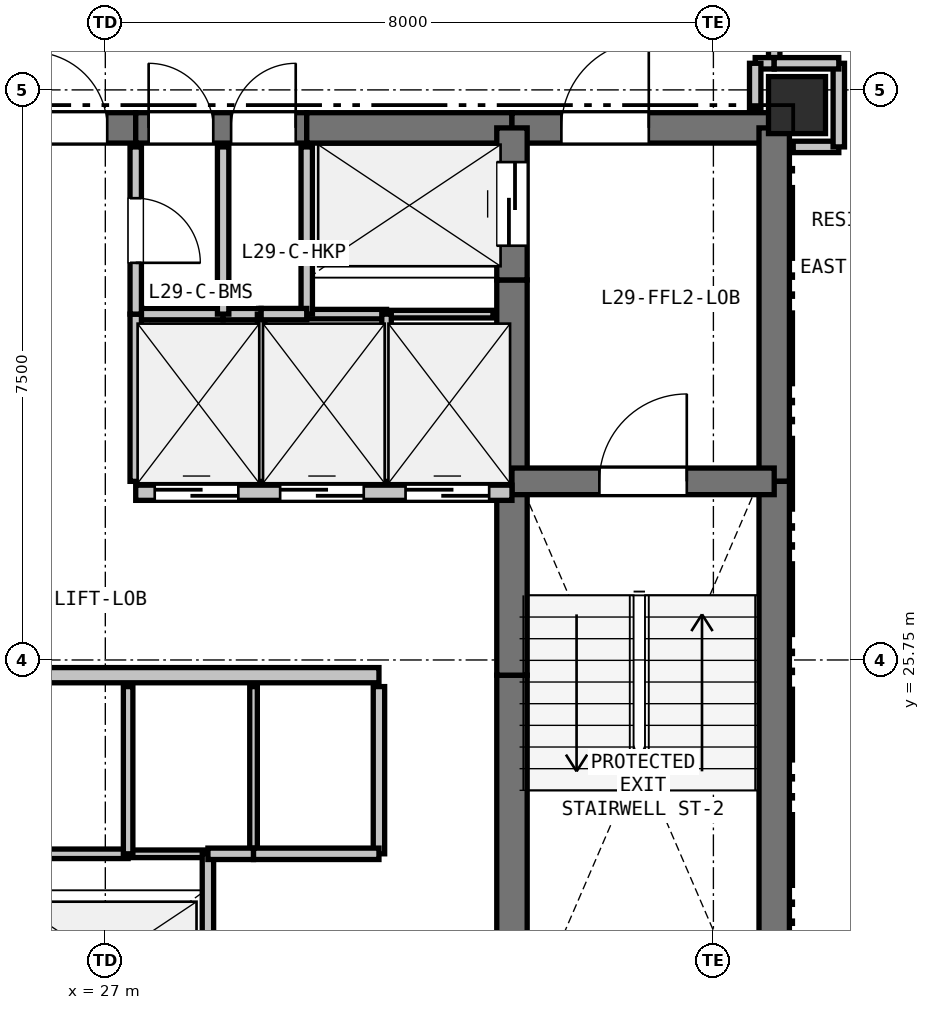
"""IFC4 building model, lengths in metres.
Left out: names, types, materials, properties, quantities, classifications, styles, units other than length and angle.
Written with IfcOpenShell. Run it as: python <this file> out.ifc"""

import sys

from ifc_helpers import new_model, si_unit, direction, frame, frame_2d, origin, origin_2d, place, context, subcontext, project, spatial, rectangle, extrude, element, fill, save


model = new_model("IFC4")
c1 = context("Model", 3, precision=1e-05, world=origin(), true_north=direction((0.0, 1.0)))
c2 = subcontext(c1, "Body", "Model", "MODEL_VIEW")
j1 = project(units=[si_unit("LENGTHUNIT", "METRE"), si_unit("PLANEANGLEUNIT", "RADIAN")], contexts=[c1])
p1 = place(None, origin())
s1 = spatial("IfcSite", under=j1, at=p1, CompositionType="ELEMENT")
p2 = place(p1, origin())
s2 = spatial("IfcBuilding", under=s1, at=p2, CompositionType="ELEMENT")
p3 = place(p2, frame((0.0, 0.0, 106.5)))
s3 = spatial("IfcBuildingStorey", under=s2, at=p3, CompositionType="ELEMENT", Elevation=106.5)
p4 = place(p3, frame((36.1, 33.05, 0.0), z_axis=(0.0, 0.0, 1.0), x_axis=(1.0, 0.0, 0.0)))
e1 = element("IfcColumn", 1, at=p4, inside=s3, PredefinedType="COLUMN", context=c2, shape_type="SweptSolid", body=[
    extrude(rectangle(XDim=0.75, YDim=0.75, at=origin_2d()), origin(), (0.0, 0.0, 1.0), 3.3),
])
p5 = place(p3, frame((25.65, 32.75, 0.0), z_axis=(0.0, 0.0, 1.0), x_axis=(1.0, 0.0, 0.0)))
e2 = element("IfcWall", 2, at=p5, inside=s3, PredefinedType="SHEAR", context=c2, shape_type="SweptSolid", body=[
    extrude(rectangle(XDim=1.75, YDim=0.4, at=frame_2d((0.875, 0.0))), origin(), (0.0, 0.0, 1.0), 3.05),
])
p6 = place(p5, frame((0.375, 0.0, 0.0)))
e3 = element("IfcOpeningElement", 3, at=p6, cuts=e2, PredefinedType="OPENING", context=c2, shape_type="SweptSolid", body=[
    extrude(rectangle(XDim=1.0, YDim=2.15, at=frame_2d((0.5, 1.075))), frame((0.0, 0.21, 0.0), z_axis=(0.0, -1.0, 0.0), x_axis=(1.0, 0.0, 0.0)), (0.0, 0.0, 1.0), 0.42),
])
p7 = place(p3, frame((27.4, 32.75, 0.0), z_axis=(0.0, 0.0, 1.0), x_axis=(1.0, 0.0, 0.0)))
e4 = element("IfcWall", 4, at=p7, inside=s3, PredefinedType="SHEAR", context=c2, shape_type="SweptSolid", body=[
    extrude(rectangle(XDim=2.25, YDim=0.4, at=frame_2d((1.125, 0.0))), origin(), (0.0, 0.0, 1.0), 3.05),
])
p8 = place(p7, frame((0.17, 0.0, 0.0)))
e5 = element("IfcOpeningElement", 5, at=p8, cuts=e4, PredefinedType="OPENING", context=c2, shape_type="SweptSolid", body=[
    extrude(rectangle(XDim=0.85, YDim=2.1, at=frame_2d((0.425, 1.05))), frame((0.0, 0.21, 0.0), z_axis=(0.0, -1.0, 0.0), x_axis=(1.0, 0.0, 0.0)), (0.0, 0.0, 1.0), 0.42),
])
p9 = place(p7, frame((1.255, 0.0, 0.0)))
e6 = element("IfcOpeningElement", 6, at=p9, cuts=e4, PredefinedType="OPENING", context=c2, shape_type="SweptSolid", body=[
    extrude(rectangle(XDim=0.85, YDim=2.1, at=frame_2d((0.425, 1.05))), frame((0.0, 0.21, 0.0), z_axis=(0.0, -1.0, 0.0), x_axis=(1.0, 0.0, 0.0)), (0.0, 0.0, 1.0), 0.42),
])
p10 = place(p3, frame((29.65, 32.75, 0.0), z_axis=(0.0, 0.0, 1.0), x_axis=(1.0, 0.0, 0.0)))
e7 = element("IfcWall", 7, at=p10, inside=s3, PredefinedType="SHEAR", context=c2, shape_type="SweptSolid", body=[
    extrude(rectangle(XDim=2.7, YDim=0.4, at=frame_2d((1.35, 0.0))), origin(), (0.0, 0.0, 1.0), 3.05),
])
p11 = place(p3, frame((32.35, 32.75, 0.0), z_axis=(0.0, 0.0, 1.0), x_axis=(1.0, 0.0, 0.0)))
e8 = element("IfcWall", 8, at=p11, inside=s3, PredefinedType="SHEAR", context=c2, shape_type="SweptSolid", body=[
    extrude(rectangle(XDim=3.45, YDim=0.4, at=frame_2d((1.725, 0.0))), origin(), (0.0, 0.0, 1.0), 3.05),
])
p12 = place(p11, frame((0.65, 0.0, 0.0)))
e9 = element("IfcOpeningElement", 9, at=p12, cuts=e8, PredefinedType="OPENING", context=c2, shape_type="SweptSolid", body=[
    extrude(rectangle(XDim=1.15, YDim=2.15, at=frame_2d((0.575, 1.075))), frame((0.0, 0.21, 0.0), z_axis=(0.0, -1.0, 0.0), x_axis=(1.0, 0.0, 0.0)), (0.0, 0.0, 1.0), 0.42),
])
p13 = place(p3, frame((35.8, 32.75, 0.0), z_axis=(0.0, 0.0, 1.0), x_axis=(0.0, -1.0, 0.0)))
e10 = element("IfcWall", 10, at=p13, inside=s3, PredefinedType="SHEAR", context=c2, shape_type="SweptSolid", body=[
    extrude(rectangle(XDim=4.65, YDim=0.4, at=frame_2d((2.325, 0.0))), origin(), (0.0, 0.0, 1.0), 3.05),
])
p14 = place(p3, frame((35.8, 28.1, 0.0), z_axis=(0.0, 0.0, 1.0), x_axis=(0.0, -1.0, 0.0)))
e11 = element("IfcWall", 11, at=p14, inside=s3, PredefinedType="SHEAR", context=c2, shape_type="SweptSolid", body=[
    extrude(rectangle(XDim=7.35, YDim=0.4, at=frame_2d((3.675, 0.0))), origin(), (0.0, 0.0, 1.0), 3.05),
])
p15 = place(p3, frame((32.35, 20.75, 0.0), z_axis=(0.0, 0.0, 1.0), x_axis=(0.0, 1.0, 0.0)))
e12 = element("IfcWall", 12, at=p15, inside=s3, PredefinedType="SHEAR", context=c2, shape_type="SweptSolid", body=[
    extrude(rectangle(XDim=4.8, YDim=0.4, at=frame_2d((2.4, 0.0))), origin(), (0.0, 0.0, 1.0), 3.05),
])
p16 = place(p3, frame((32.35, 25.55, 0.0), z_axis=(0.0, 0.0, 1.0), x_axis=(0.0, 1.0, 0.0)))
e13 = element("IfcWall", 13, at=p16, inside=s3, PredefinedType="SHEAR", context=c2, shape_type="SweptSolid", body=[
    extrude(rectangle(XDim=2.4, YDim=0.4, at=frame_2d((1.2, 0.0))), origin(), (0.0, 0.0, 1.0), 3.05),
])
p17 = place(p3, frame((32.35, 27.95, 0.0), z_axis=(0.0, 0.0, 1.0), x_axis=(0.0, 1.0, 0.0)))
e14 = element("IfcWall", 14, at=p17, inside=s3, PredefinedType="SHEAR", context=c2, shape_type="SweptSolid", body=[
    extrude(rectangle(XDim=2.8, YDim=0.4, at=frame_2d((1.4, 0.0))), origin(), (0.0, 0.0, 1.0), 3.05),
])
p18 = place(p3, frame((32.35, 30.75, 0.0), z_axis=(0.0, 0.0, 1.0), x_axis=(0.0, 1.0, 0.0)))
e15 = element("IfcWall", 15, at=p18, inside=s3, PredefinedType="SHEAR", context=c2, shape_type="SweptSolid", body=[
    extrude(rectangle(XDim=2.0, YDim=0.4, at=frame_2d((1.0, 0.0))), origin(), (0.0, 0.0, 1.0), 3.05),
])
p19 = place(p18, frame((0.45, 0.0, 0.0)))
e16 = element("IfcOpeningElement", 16, at=p19, cuts=e15, PredefinedType="OPENING", context=c2, shape_type="SweptSolid", body=[
    extrude(rectangle(XDim=1.1, YDim=2.15, at=frame_2d((0.55, 1.075))), frame((0.0, 0.21, 0.0), z_axis=(0.0, -1.0, 0.0), x_axis=(1.0, 0.0, 0.0)), (0.0, 0.0, 1.0), 0.42),
])
p20 = place(p3, frame((32.35, 28.1, 0.0), z_axis=(0.0, 0.0, 1.0), x_axis=(1.0, 0.0, 0.0)))
e17 = element("IfcWall", 17, at=p20, inside=s3, PredefinedType="SHEAR", context=c2, shape_type="SweptSolid", body=[
    extrude(rectangle(XDim=3.45, YDim=0.35, at=frame_2d((1.725, 0.0))), origin(), (0.0, 0.0, 1.0), 3.05),
])
p21 = place(p20, frame((1.15, 0.0, 0.0)))
e18 = element("IfcOpeningElement", 18, at=p21, cuts=e17, PredefinedType="OPENING", context=c2, shape_type="SweptSolid", body=[
    extrude(rectangle(XDim=1.15, YDim=2.15, at=frame_2d((0.575, 1.075))), frame((0.0, 0.185, 0.0), z_axis=(0.0, -1.0, 0.0), x_axis=(1.0, 0.0, 0.0)), (0.0, 0.0, 1.0), 0.37),
])
p22 = place(p3, frame((25.65, 25.55, 0.0), z_axis=(0.0, 0.0, 1.0), x_axis=(1.0, 0.0, 0.0)))
e19 = element("IfcWall", 19, at=p22, inside=s3, PredefinedType="PARTITIONING", context=c2, shape_type="SweptSolid", body=[
    extrude(rectangle(XDim=4.95, YDim=0.2, at=frame_2d((2.475, 0.0))), origin(), (0.0, 0.0, 1.0), 3.05),
])
p23 = place(p3, frame((27.4, 27.95, 0.0), z_axis=(0.0, 0.0, 1.0), x_axis=(1.0, 0.0, 0.0)))
e20 = element("IfcWall", 20, at=p23, inside=s3, PredefinedType="PARTITIONING", context=c2, shape_type="SweptSolid", body=[
    extrude(rectangle(XDim=4.95, YDim=0.2, at=frame_2d((2.475, 0.0))), origin(), (0.0, 0.0, 1.0), 3.05),
])
p24 = place(p23, frame((0.25, 0.0, 0.0)))
e21 = element("IfcOpeningElement", 21, at=p24, cuts=e20, PredefinedType="OPENING", context=c2, shape_type="SweptSolid", body=[
    extrude(rectangle(XDim=1.1, YDim=2.15, at=frame_2d((0.55, 1.075))), frame((0.0, 0.11, 0.0), z_axis=(0.0, -1.0, 0.0), x_axis=(1.0, 0.0, 0.0)), (0.0, 0.0, 1.0), 0.22),
])
p25 = place(p23, frame((1.9, 0.0, 0.0)))
e22 = element("IfcOpeningElement", 22, at=p25, cuts=e20, PredefinedType="OPENING", context=c2, shape_type="SweptSolid", body=[
    extrude(rectangle(XDim=1.1, YDim=2.15, at=frame_2d((0.55, 1.075))), frame((0.0, 0.11, 0.0), z_axis=(0.0, -1.0, 0.0), x_axis=(1.0, 0.0, 0.0)), (0.0, 0.0, 1.0), 0.22),
])
p26 = place(p23, frame((3.55, 0.0, 0.0)))
e23 = element("IfcOpeningElement", 23, at=p26, cuts=e20, PredefinedType="OPENING", context=c2, shape_type="SweptSolid", body=[
    extrude(rectangle(XDim=1.1, YDim=2.15, at=frame_2d((0.55, 1.075))), frame((0.0, 0.11, 0.0), z_axis=(0.0, -1.0, 0.0), x_axis=(1.0, 0.0, 0.0)), (0.0, 0.0, 1.0), 0.22),
])
p27 = place(p3, frame((25.9, 23.2, 0.0), z_axis=(0.0, 0.0, 1.0), x_axis=(1.0, 0.0, 0.0)))
e24 = element("IfcWall", 24, at=p27, inside=s3, PredefinedType="PARTITIONING", context=c2, shape_type="SweptSolid", body=[
    extrude(rectangle(XDim=1.4, YDim=0.125, at=frame_2d((0.7, 0.0))), origin(), (0.0, 0.0, 1.0), 3.05),
])
p28 = place(p3, frame((27.3, 23.2, 0.0), z_axis=(0.0, 0.0, 1.0), x_axis=(1.0, 0.0, 0.0)))
e25 = element("IfcWall", 25, at=p28, inside=s3, PredefinedType="PARTITIONING", context=c2, shape_type="SweptSolid", body=[
    extrude(rectangle(XDim=1.05, YDim=0.1, at=frame_2d((0.525, 0.0))), origin(), (0.0, 0.0, 1.0), 3.05),
])
p29 = place(p3, frame((28.35, 23.2, 0.0), z_axis=(0.0, 0.0, 1.0), x_axis=(0.0, -1.0, 0.0)))
e26 = element("IfcWall", 26, at=p29, inside=s3, PredefinedType="PARTITIONING", context=c2, shape_type="SweptSolid", body=[
    extrude(rectangle(XDim=2.2, YDim=0.15, at=frame_2d((1.1, 0.0))), origin(), (0.0, 0.0, 1.0), 3.05),
])
p30 = place(p3, frame((32.1, 30.3, 0.0), z_axis=(0.0, 0.0, 1.0), x_axis=(-1.0, 0.0, 0.0)))
e27 = element("IfcWall", 27, at=p30, inside=s3, PredefinedType="PARTITIONING", context=c2, shape_type="SweptSolid", body=[
    extrude(rectangle(XDim=1.4, YDim=0.1, at=frame_2d((0.7, 0.0))), origin(), (0.0, 0.0, 1.0), 3.05),
])
p31 = place(p3, frame((30.7, 30.3, 0.0), z_axis=(0.0, 0.0, 1.0), x_axis=(-1.0, 0.0, 0.0)))
e28 = element("IfcWall", 28, at=p31, inside=s3, PredefinedType="PARTITIONING", context=c2, shape_type="SweptSolid", body=[
    extrude(rectangle(XDim=1.05, YDim=0.125, at=frame_2d((0.525, 0.0))), origin(), (0.0, 0.0, 1.0), 3.05),
])
p32 = place(p3, frame((29.65, 30.3, 0.0), z_axis=(0.0, 0.0, 1.0), x_axis=(0.0, 1.0, 0.0)))
e29 = element("IfcWall", 29, at=p32, inside=s3, PredefinedType="PARTITIONING", context=c2, shape_type="SweptSolid", body=[
    extrude(rectangle(XDim=2.2, YDim=0.15, at=frame_2d((1.1, 0.0))), origin(), (0.0, 0.0, 1.0), 3.05),
])
p33 = place(p3, frame((27.3, 25.4, 0.0), z_axis=(0.0, 0.0, 1.0), x_axis=(0.0, -1.0, 0.0)))
e30 = element("IfcWall", 30, at=p33, inside=s3, PredefinedType="PARTITIONING", context=c2, shape_type="SweptSolid", body=[
    extrude(rectangle(XDim=2.2, YDim=0.125, at=frame_2d((1.1, 0.0))), origin(), (0.0, 0.0, 1.0), 3.05),
])
p34 = place(p3, frame((28.95, 25.4, 0.0), z_axis=(0.0, 0.0, 1.0), x_axis=(0.0, -1.0, 0.0)))
e31 = element("IfcWall", 31, at=p34, inside=s3, PredefinedType="PARTITIONING", context=c2, shape_type="SweptSolid", body=[
    extrude(rectangle(XDim=2.2, YDim=0.1, at=frame_2d((1.1, 0.0))), origin(), (0.0, 0.0, 1.0), 3.05),
])
p35 = place(p3, frame((28.95, 23.2, 0.0), z_axis=(0.0, 0.0, 1.0), x_axis=(-1.0, 0.0, 0.0)))
e32 = element("IfcWall", 32, at=p35, inside=s3, PredefinedType="PARTITIONING", context=c2, shape_type="SweptSolid", body=[
    extrude(rectangle(XDim=0.6, YDim=0.15, at=frame_2d((0.3, 0.0))), origin(), (0.0, 0.0, 1.0), 3.05),
])
p36 = place(p3, frame((30.6, 25.4, 0.0), z_axis=(0.0, 0.0, 1.0), x_axis=(0.0, -1.0, 0.0)))
e33 = element("IfcWall", 33, at=p36, inside=s3, PredefinedType="PARTITIONING", context=c2, shape_type="SweptSolid", body=[
    extrude(rectangle(XDim=2.2, YDim=0.15, at=frame_2d((1.1, 0.0))), origin(), (0.0, 0.0, 1.0), 3.05),
])
p37 = place(p3, frame((30.6, 23.2, 0.0), z_axis=(0.0, 0.0, 1.0), x_axis=(-1.0, 0.0, 0.0)))
e34 = element("IfcWall", 34, at=p37, inside=s3, PredefinedType="PARTITIONING", context=c2, shape_type="SweptSolid", body=[
    extrude(rectangle(XDim=1.65, YDim=0.15, at=frame_2d((0.825, 0.0))), origin(), (0.0, 0.0, 1.0), 3.05),
])
p38 = place(p3, frame((27.4, 30.3, 0.0), z_axis=(0.0, 0.0, 1.0), x_axis=(1.0, 0.0, 0.0)))
e35 = element("IfcWall", 35, at=p38, inside=s3, PredefinedType="PARTITIONING", context=c2, shape_type="SweptSolid", body=[
    extrude(rectangle(XDim=1.15, YDim=0.15, at=frame_2d((0.575, 0.0))), origin(), (0.0, 0.0, 1.0), 3.05),
])
p39 = place(p3, frame((28.55, 30.3, 0.0), z_axis=(0.0, 0.0, 1.0), x_axis=(1.0, 0.0, 0.0)))
e36 = element("IfcWall", 36, at=p39, inside=s3, PredefinedType="PARTITIONING", context=c2, shape_type="SweptSolid", body=[
    extrude(rectangle(XDim=0.5, YDim=0.15, at=frame_2d((0.25, 0.0))), origin(), (0.0, 0.0, 1.0), 3.05),
])
p40 = place(p3, frame((29.05, 30.3, 0.0), z_axis=(0.0, 0.0, 1.0), x_axis=(0.0, -1.0, 0.0)))
e37 = element("IfcWall", 37, at=p40, inside=s3, PredefinedType="PARTITIONING", context=c2, shape_type="SweptSolid", body=[
    extrude(rectangle(XDim=2.2, YDim=0.1, at=frame_2d((1.1, 0.0))), origin(), (0.0, 0.0, 1.0), 3.05),
])
p41 = place(p3, frame((27.4, 28.1, 0.0), z_axis=(0.0, 0.0, 1.0), x_axis=(0.0, 1.0, 0.0)))
e38 = element("IfcWall", 38, at=p41, inside=s3, PredefinedType="PARTITIONING", context=c2, shape_type="SweptSolid", body=[
    extrude(rectangle(XDim=2.2, YDim=0.15, at=frame_2d((1.1, 0.0))), origin(), (0.0, 0.0, 1.0), 3.05),
])
p42 = place(p3, frame((29.05, 30.3, 0.0), z_axis=(0.0, 0.0, 1.0), x_axis=(1.0, 0.0, 0.0)))
e39 = element("IfcWall", 39, at=p42, inside=s3, PredefinedType="PARTITIONING", context=c2, shape_type="SweptSolid", body=[
    extrude(rectangle(XDim=0.6, YDim=0.15, at=frame_2d((0.3, 0.0))), origin(), (0.0, 0.0, 1.0), 3.05),
])
p43 = place(p3, frame((30.7, 30.3, 0.0), z_axis=(0.0, 0.0, 1.0), x_axis=(0.0, -1.0, 0.0)))
e40 = element("IfcWall", 40, at=p43, inside=s3, PredefinedType="PARTITIONING", context=c2, shape_type="SweptSolid", body=[
    extrude(rectangle(XDim=2.2, YDim=0.125, at=frame_2d((1.1, 0.0))), origin(), (0.0, 0.0, 1.0), 3.05),
])
p44 = place(p3, frame((27.4, 32.5, 0.0), z_axis=(0.0, 0.0, 1.0), x_axis=(0.0, -1.0, 0.0)))
e41 = element("IfcWall", 41, at=p44, inside=s3, PredefinedType="PARTITIONING", context=c2, shape_type="SweptSolid", body=[
    extrude(rectangle(XDim=2.2, YDim=0.15, at=frame_2d((1.1, 0.0))), origin(), (0.0, 0.0, 1.0), 3.05),
])
p45 = place(p44, frame((0.675, 0.0, 0.0)))
e42 = element("IfcOpeningElement", 42, at=p45, cuts=e41, PredefinedType="OPENING", context=c2, shape_type="SweptSolid", body=[
    extrude(rectangle(XDim=0.85, YDim=2.1, at=frame_2d((0.425, 1.05))), frame((0.0, 0.085, 0.0), z_axis=(0.0, -1.0, 0.0), x_axis=(1.0, 0.0, 0.0)), (0.0, 0.0, 1.0), 0.17),
])
p46 = place(p3, frame((35.8, 35.35, 0.0), z_axis=(0.0, 0.0, 1.0), x_axis=(0.0, -1.0, 0.0)))
e43 = element("IfcWall", 43, at=p46, inside=s3, PredefinedType="PARTITIONING", context=c2, shape_type="SweptSolid", body=[
    extrude(rectangle(XDim=1.75, YDim=0.15, at=frame_2d((0.875, 0.0))), origin(), (0.0, 0.0, 1.0), 3.05),
])
p47 = place(p46, frame((0.375, 0.0, 0.0)))
e44 = element("IfcOpeningElement", 44, at=p47, cuts=e43, PredefinedType="OPENING", context=c2, shape_type="SweptSolid", body=[
    extrude(rectangle(XDim=1.0, YDim=2.15, at=frame_2d((0.5, 1.075))), frame((0.0, 0.085, 0.0), z_axis=(0.0, -1.0, 0.0), x_axis=(1.0, 0.0, 0.0)), (0.0, 0.0, 1.0), 0.17),
])
p48 = place(p3, frame((35.8, 33.6, 0.0), z_axis=(0.0, 0.0, 1.0), x_axis=(-1.0, 0.0, 0.0)))
e45 = element("IfcWall", 45, at=p48, inside=s3, PredefinedType="PARTITIONING", context=c2, shape_type="SweptSolid", body=[
    extrude(rectangle(XDim=0.25, YDim=0.15, at=frame_2d((0.125, 0.0))), origin(), (0.0, 0.0, 1.0), 3.05),
])
p49 = place(p3, frame((35.55, 33.6, 0.0), z_axis=(0.0, 0.0, 1.0), x_axis=(0.0, -1.0, 0.0)))
e46 = element("IfcWall", 46, at=p49, inside=s3, PredefinedType="PARTITIONING", context=c2, shape_type="SweptSolid", body=[
    extrude(rectangle(XDim=0.6, YDim=0.15, at=frame_2d((0.3, 0.0))), origin(), (0.0, 0.0, 1.0), 2.498),
])
p50 = place(p3, frame((36.05, 32.5, 0.0), z_axis=(0.0, 0.0, 1.0), x_axis=(1.0, 0.0, 0.0)))
e47 = element("IfcWall", 47, at=p50, inside=s3, PredefinedType="PARTITIONING", context=c2, shape_type="SweptSolid", body=[
    extrude(rectangle(XDim=0.6, YDim=0.15, at=frame_2d((0.3, 0.0))), origin(), (0.0, 0.0, 1.0), 2.498),
])
p51 = place(p3, frame((36.65, 32.5, 0.0), z_axis=(0.0, 0.0, 1.0), x_axis=(0.0, 1.0, 0.0)))
e48 = element("IfcWall", 48, at=p51, inside=s3, PredefinedType="PARTITIONING", context=c2, shape_type="SweptSolid", body=[
    extrude(rectangle(XDim=1.1, YDim=0.15, at=frame_2d((0.55, 0.0))), origin(), (0.0, 0.0, 1.0), 2.423),
])
p52 = place(p3, frame((36.65, 33.6, 0.0), z_axis=(0.0, 0.0, 1.0), x_axis=(-1.0, 0.0, 0.0)))
e49 = element("IfcWall", 49, at=p52, inside=s3, PredefinedType="PARTITIONING", context=c2, shape_type="SweptSolid", body=[
    extrude(rectangle(XDim=0.85, YDim=0.15, at=frame_2d((0.425, 0.0))), origin(), (0.0, 0.0, 1.0), 2.423),
])
p53 = place(p3, frame((28.55, 32.5, 0.0), z_axis=(0.0, 0.0, 1.0), x_axis=(0.0, -1.0, 0.0)))
e50 = element("IfcWall", 50, at=p53, inside=s3, PredefinedType="PARTITIONING", context=c2, shape_type="SweptSolid", body=[
    extrude(rectangle(XDim=2.2, YDim=0.15, at=frame_2d((1.1, 0.0))), origin(), (0.0, 0.0, 1.0), 3.05),
])
p54 = place(p24, origin())
e51 = element("IfcDoor", 51, at=p54, inside=s3, OperationType="SLIDING_TO_LEFT", PredefinedType="DOOR", context=c2, shape_type="SweptSolid", body=[
    extrude(rectangle(XDim=1.1, YDim=2.15, at=frame_2d((0.55, 1.075))), frame((0.0, 0.025, 0.0), z_axis=(0.0, -1.0, 0.0), x_axis=(1.0, 0.0, 0.0)), (0.0, 0.0, 1.0), 0.05),
])
fill(e21, e51)
p55 = place(p25, origin())
e52 = element("IfcDoor", 52, at=p55, inside=s3, OperationType="SLIDING_TO_LEFT", PredefinedType="DOOR", context=c2, shape_type="SweptSolid", body=[
    extrude(rectangle(XDim=1.1, YDim=2.15, at=frame_2d((0.55, 1.075))), frame((0.0, 0.025, 0.0), z_axis=(0.0, -1.0, 0.0), x_axis=(1.0, 0.0, 0.0)), (0.0, 0.0, 1.0), 0.05),
])
fill(e22, e52)
p56 = place(p26, origin())
e53 = element("IfcDoor", 53, at=p56, inside=s3, OperationType="SLIDING_TO_LEFT", PredefinedType="DOOR", context=c2, shape_type="SweptSolid", body=[
    extrude(rectangle(XDim=1.1, YDim=2.15, at=frame_2d((0.55, 1.075))), frame((0.0, 0.025, 0.0), z_axis=(0.0, -1.0, 0.0), x_axis=(1.0, 0.0, 0.0)), (0.0, 0.0, 1.0), 0.05),
])
fill(e23, e53)
p57 = place(p6, origin())
e54 = element("IfcDoor", 54, at=p57, inside=s3, OperationType="SINGLE_SWING_LEFT", PredefinedType="DOOR", context=c2, shape_type="SweptSolid", body=[
    extrude(rectangle(XDim=1.0, YDim=2.15, at=frame_2d((0.5, 1.075))), frame((0.0, 0.025, 0.0), z_axis=(0.0, -1.0, 0.0), x_axis=(1.0, 0.0, 0.0)), (0.0, 0.0, 1.0), 0.05),
])
fill(e3, e54)
p58 = place(p19, origin())
e55 = element("IfcDoor", 55, at=p58, inside=s3, OperationType="SLIDING_TO_LEFT", PredefinedType="DOOR", context=c2, shape_type="SweptSolid", body=[
    extrude(rectangle(XDim=1.1, YDim=2.15, at=frame_2d((0.55, 1.075))), frame((0.0, 0.025, 0.0), z_axis=(0.0, -1.0, 0.0), x_axis=(1.0, 0.0, 0.0)), (0.0, 0.0, 1.0), 0.05),
])
fill(e16, e55)
p59 = place(p21, origin())
e56 = element("IfcDoor", 56, at=p59, inside=s3, OperationType="SINGLE_SWING_RIGHT", PredefinedType="DOOR", context=c2, shape_type="SweptSolid", body=[
    extrude(rectangle(XDim=1.15, YDim=2.15, at=frame_2d((0.575, 1.075))), frame((0.0, 0.025, 0.0), z_axis=(0.0, -1.0, 0.0), x_axis=(1.0, 0.0, 0.0)), (0.0, 0.0, 1.0), 0.05),
])
fill(e18, e56)
p60 = place(p12, origin())
e57 = element("IfcDoor", 57, at=p60, inside=s3, OperationType="SINGLE_SWING_RIGHT", PredefinedType="DOOR", context=c2, shape_type="SweptSolid", body=[
    extrude(rectangle(XDim=1.15, YDim=2.15, at=frame_2d((0.575, 1.075))), frame((0.0, 0.025, 0.0), z_axis=(0.0, -1.0, 0.0), x_axis=(1.0, 0.0, 0.0)), (0.0, 0.0, 1.0), 0.05),
])
fill(e9, e57)
p61 = place(p45, origin())
e58 = element("IfcDoor", 58, at=p61, inside=s3, OperationType="SINGLE_SWING_RIGHT", PredefinedType="DOOR", context=c2, shape_type="SweptSolid", body=[
    extrude(rectangle(XDim=0.85, YDim=2.1, at=frame_2d((0.425, 1.05))), frame((0.0, 0.025, 0.0), z_axis=(0.0, -1.0, 0.0), x_axis=(1.0, 0.0, 0.0)), (0.0, 0.0, 1.0), 0.05),
])
fill(e42, e58)
p62 = place(p8, origin())
e59 = element("IfcDoor", 59, at=p62, inside=s3, OperationType="SINGLE_SWING_LEFT", PredefinedType="DOOR", context=c2, shape_type="SweptSolid", body=[
    extrude(rectangle(XDim=0.85, YDim=2.1, at=frame_2d((0.425, 1.05))), frame((0.0, 0.025, 0.0), z_axis=(0.0, -1.0, 0.0), x_axis=(1.0, 0.0, 0.0)), (0.0, 0.0, 1.0), 0.05),
])
fill(e5, e59)
p63 = place(p9, origin())
e60 = element("IfcDoor", 60, at=p63, inside=s3, OperationType="SINGLE_SWING_RIGHT", PredefinedType="DOOR", context=c2, shape_type="SweptSolid", body=[
    extrude(rectangle(XDim=0.85, YDim=2.1, at=frame_2d((0.425, 1.05))), frame((0.0, 0.025, 0.0), z_axis=(0.0, -1.0, 0.0), x_axis=(1.0, 0.0, 0.0)), (0.0, 0.0, 1.0), 0.05),
])
fill(e6, e60)
save(model, sys.argv[1])
